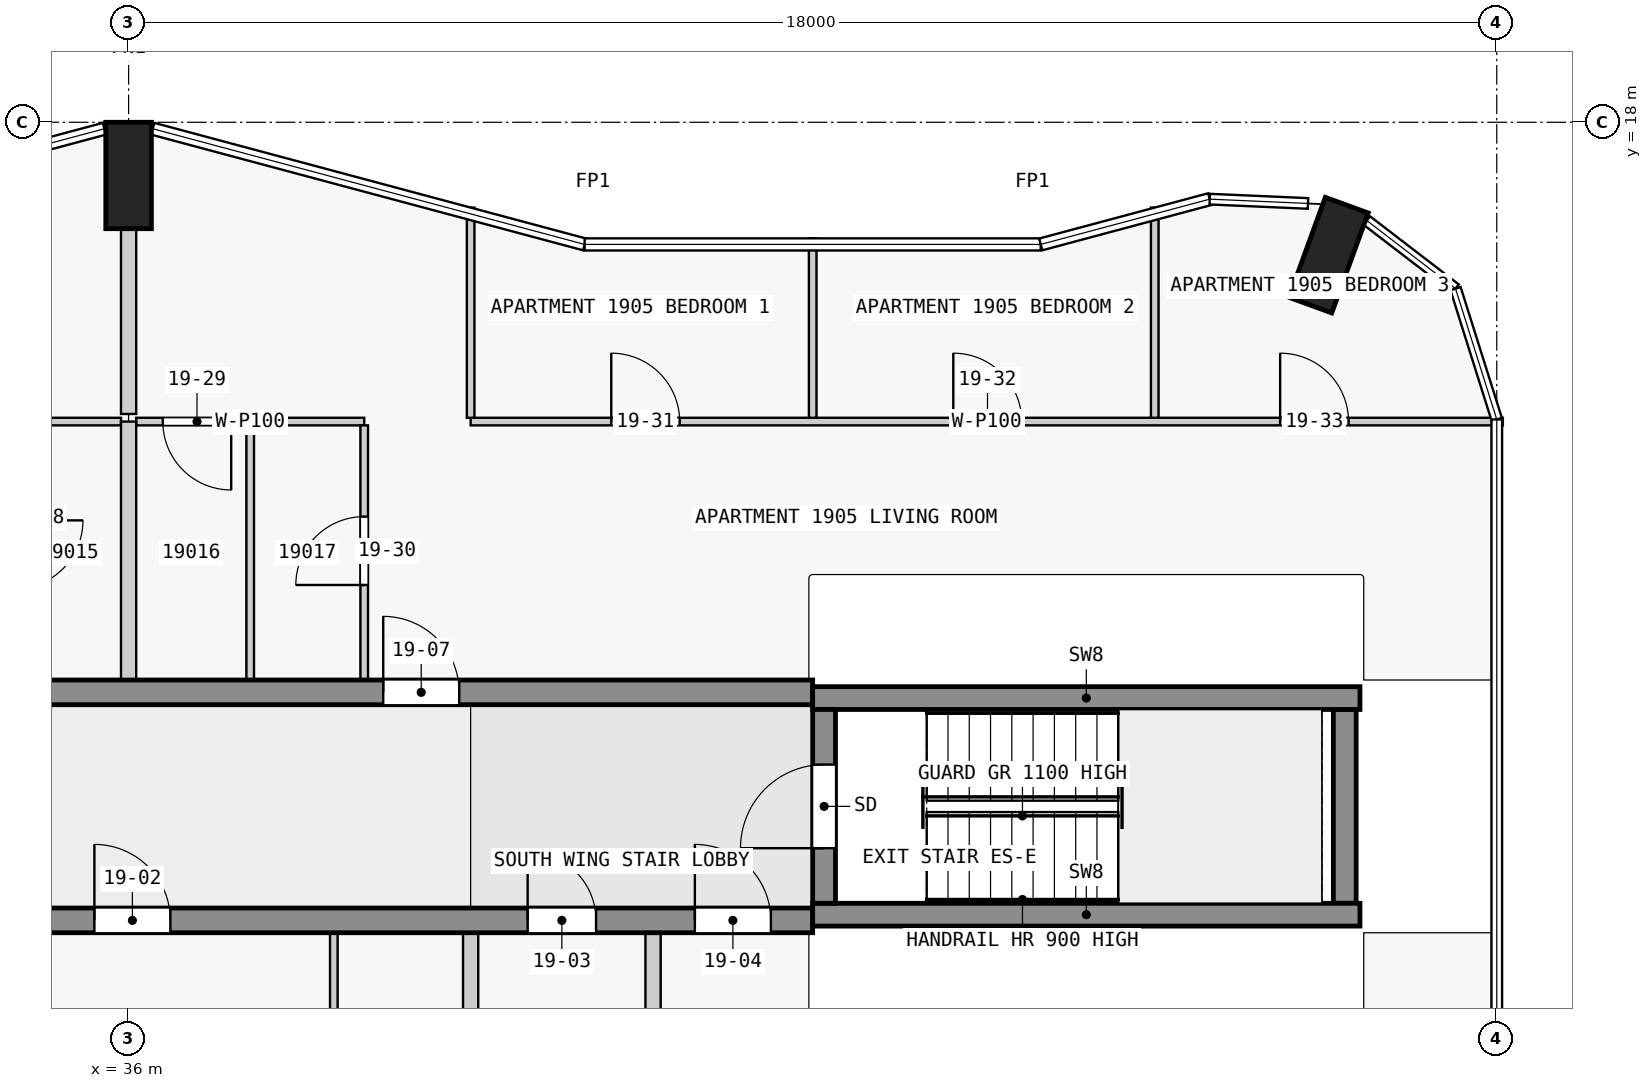
"""IFC4 building model, lengths in metres.
Left out: names, types, materials, properties, quantities, classifications, styles, units other than length and angle.
Written with IfcOpenShell. Run it as: python <this file> out.ifc"""

import sys

from ifc_helpers import new_model, si_unit, direction, frame, frame_2d, origin, origin_2d, place, context, subcontext, project, spatial, rectangle, extrude, element, fill, save


model = new_model("IFC4")
c1 = context("Model", 3, precision=1e-05, world=origin(), true_north=direction((0.0, 1.0)))
c2 = subcontext(c1, "Body", "Model", "MODEL_VIEW")
j1 = project(units=[si_unit("LENGTHUNIT", "METRE"), si_unit("PLANEANGLEUNIT", "RADIAN")], contexts=[c1])
p1 = place(None, origin())
s1 = spatial("IfcSite", under=j1, at=p1, CompositionType="ELEMENT")
p2 = place(p1, origin())
s2 = spatial("IfcBuilding", under=s1, at=p2, CompositionType="ELEMENT")
p3 = place(p2, frame((0.0, 0.0, 78.3)))
s3 = spatial("IfcBuildingStorey", under=s2, at=p3, CompositionType="ELEMENT", Elevation=78.3)
for number, where, z_axis, x_axis in (
    (1, (51.787, 16.252, 0.0), (0.0, 0.0, 1.0), (-0.94, 0.342, 0.0)),
    (2, (36.0, 17.3, 0.0), (0.0, 0.0, 1.0), (1.0, 0.0, 0.0)),
):
    element("IfcColumn", number, at=place(p3, frame(where, z_axis=z_axis, x_axis=x_axis)), inside=s3, PredefinedType="COLUMN", context=c2, shape_type="SweptSolid", body=[
        extrude(rectangle(XDim=0.6, YDim=1.4, at=origin_2d()), origin(), (0.0, 0.0, 1.0), 3.5),
    ])
p4 = place(p3, frame((45.15, 7.725, 0.0), z_axis=(0.0, 0.0, 1.0), x_axis=(0.0, 1.0, 0.0)))
e3 = element("IfcWall", 3, at=p4, inside=s3, PredefinedType="SHEAR", context=c2, shape_type="SweptSolid", body=[
    extrude(rectangle(XDim=2.55, YDim=0.3, at=frame_2d((1.275, 0.0))), origin(), (0.0, 0.0, 1.0), 3.5),
])
p5 = place(p4, frame((0.725, 0.0, 0.0)))
e4 = element("IfcOpeningElement", 4, at=p5, cuts=e3, PredefinedType="OPENING", context=c2, shape_type="SweptSolid", body=[
    extrude(rectangle(XDim=1.1, YDim=2.1, at=frame_2d((0.55, 1.05))), frame((0.0, 0.16, 0.0), z_axis=(0.0, -1.0, 0.0), x_axis=(1.0, 0.0, 0.0)), (0.0, 0.0, 1.0), 0.32),
])
p6 = place(p3, frame((52.0, 7.725, 0.0), z_axis=(0.0, 0.0, 1.0), x_axis=(0.0, 1.0, 0.0)))
e5 = element("IfcWall", 5, at=p6, inside=s3, PredefinedType="SHEAR", context=c2, shape_type="SweptSolid", body=[
    extrude(rectangle(XDim=2.55, YDim=0.3, at=frame_2d((1.275, 0.0))), origin(), (0.0, 0.0, 1.0), 3.5),
])
for number, where, z_axis, x_axis in (
    (6, (45.0, 7.575, 0.0), (0.0, 0.0, 1.0), (1.0, 0.0, 0.0)),
    (7, (45.0, 10.425, 0.0), (0.0, 0.0, 1.0), (1.0, 0.0, 0.0)),
):
    element("IfcWall", number, at=place(p3, frame(where, z_axis=z_axis, x_axis=x_axis)), inside=s3, PredefinedType="SHEAR", context=c2, shape_type="SweptSolid", body=[
        extrude(rectangle(XDim=7.2, YDim=0.3, at=frame_2d((3.6, 0.0))), origin(), (0.0, 0.0, 1.0), 3.5),
    ])
p7 = place(p3, frame((22.5, 7.5, 0.0), z_axis=(0.0, 0.0, 1.0), x_axis=(1.0, 0.0, 0.0)))
e8 = element("IfcWall", 8, at=p7, inside=s3, PredefinedType="SHEAR", context=c2, shape_type="SweptSolid", body=[
    extrude(rectangle(XDim=22.5, YDim=0.325, at=frame_2d((11.25, 0.0))), origin(), (0.0, 0.0, 1.0), 3.25),
])
p8 = place(p7, frame((4.05, 0.0, 0.0)))
e9 = element("IfcOpeningElement", 9, at=p8, cuts=e8, PredefinedType="OPENING", context=c2, shape_type="SweptSolid", body=[
    extrude(rectangle(XDim=1.0, YDim=2.1, at=frame_2d((0.5, 1.05))), frame((0.0, 0.172, 0.0), z_axis=(0.0, -1.0, 0.0), x_axis=(1.0, 0.0, 0.0)), (0.0, 0.0, 1.0), 0.345),
])
p9 = place(p7, frame((13.05, 0.0, 0.0)))
e10 = element("IfcOpeningElement", 10, at=p9, cuts=e8, PredefinedType="OPENING", context=c2, shape_type="SweptSolid", body=[
    extrude(rectangle(XDim=1.0, YDim=2.1, at=frame_2d((0.5, 1.05))), frame((0.0, 0.172, 0.0), z_axis=(0.0, -1.0, 0.0), x_axis=(1.0, 0.0, 0.0)), (0.0, 0.0, 1.0), 0.345),
])
p10 = place(p7, frame((18.75, 0.0, 0.0)))
e11 = element("IfcOpeningElement", 11, at=p10, cuts=e8, PredefinedType="OPENING", context=c2, shape_type="SweptSolid", body=[
    extrude(rectangle(XDim=0.9, YDim=2.1, at=frame_2d((0.45, 1.05))), frame((0.0, 0.172, 0.0), z_axis=(0.0, -1.0, 0.0), x_axis=(1.0, 0.0, 0.0)), (0.0, 0.0, 1.0), 0.345),
])
p11 = place(p7, frame((20.95, 0.0, 0.0)))
e12 = element("IfcOpeningElement", 12, at=p11, cuts=e8, PredefinedType="OPENING", context=c2, shape_type="SweptSolid", body=[
    extrude(rectangle(XDim=1.0, YDim=2.1, at=frame_2d((0.5, 1.05))), frame((0.0, 0.172, 0.0), z_axis=(0.0, -1.0, 0.0), x_axis=(1.0, 0.0, 0.0)), (0.0, 0.0, 1.0), 0.345),
])
p12 = place(p3, frame((22.5, 10.5, 0.0), z_axis=(0.0, 0.0, 1.0), x_axis=(1.0, 0.0, 0.0)))
e13 = element("IfcWall", 13, at=p12, inside=s3, PredefinedType="SHEAR", context=c2, shape_type="SweptSolid", body=[
    extrude(rectangle(XDim=22.5, YDim=0.325, at=frame_2d((11.25, 0.0))), origin(), (0.0, 0.0, 1.0), 3.25),
])
p13 = place(p12, frame((4.05, 0.0, 0.0)))
e14 = element("IfcOpeningElement", 14, at=p13, cuts=e13, PredefinedType="OPENING", context=c2, shape_type="SweptSolid", body=[
    extrude(rectangle(XDim=1.0, YDim=2.1, at=frame_2d((0.5, 1.05))), frame((0.0, 0.172, 0.0), z_axis=(0.0, -1.0, 0.0), x_axis=(1.0, 0.0, 0.0)), (0.0, 0.0, 1.0), 0.345),
])
p14 = place(p12, frame((10.75, 0.0, 0.0)))
e15 = element("IfcOpeningElement", 15, at=p14, cuts=e13, PredefinedType="OPENING", context=c2, shape_type="SweptSolid", body=[
    extrude(rectangle(XDim=1.0, YDim=2.1, at=frame_2d((0.5, 1.05))), frame((0.0, 0.172, 0.0), z_axis=(0.0, -1.0, 0.0), x_axis=(1.0, 0.0, 0.0)), (0.0, 0.0, 1.0), 0.345),
])
p15 = place(p12, frame((16.85, 0.0, 0.0)))
e16 = element("IfcOpeningElement", 16, at=p15, cuts=e13, PredefinedType="OPENING", context=c2, shape_type="SweptSolid", body=[
    extrude(rectangle(XDim=1.0, YDim=2.1, at=frame_2d((0.5, 1.05))), frame((0.0, 0.172, 0.0), z_axis=(0.0, -1.0, 0.0), x_axis=(1.0, 0.0, 0.0)), (0.0, 0.0, 1.0), 0.345),
])
p16 = place(p3, frame((35.9, 14.062, 0.0), z_axis=(0.0, 0.0, 1.0), x_axis=(-1.0, 0.0, 0.0)))
e17 = element("IfcWall", 17, at=p16, inside=s3, PredefinedType="PARTITIONING", context=c2, shape_type="SweptSolid", body=[
    extrude(rectangle(XDim=1.4, YDim=0.1, at=frame_2d((0.7, 0.0))), origin(), (0.0, 0.0, 1.0), 3.25),
])
p17 = place(p3, frame((39.1, 14.062, 0.0), z_axis=(0.0, 0.0, 1.0), x_axis=(-1.0, 0.0, 0.0)))
e18 = element("IfcWall", 18, at=p17, inside=s3, PredefinedType="PARTITIONING", context=c2, shape_type="SweptSolid", body=[
    extrude(rectangle(XDim=3.0, YDim=0.1, at=frame_2d((1.5, 0.0))), origin(), (0.0, 0.0, 1.0), 3.25),
])
p18 = place(p17, frame((1.75, 0.0, 0.0)))
e19 = element("IfcOpeningElement", 19, at=p18, cuts=e18, PredefinedType="OPENING", context=c2, shape_type="SweptSolid", body=[
    extrude(rectangle(XDim=0.9, YDim=2.1, at=frame_2d((0.45, 1.05))), frame((0.0, 0.06, 0.0), z_axis=(0.0, -1.0, 0.0), x_axis=(1.0, 0.0, 0.0)), (0.0, 0.0, 1.0), 0.12),
])
p19 = place(p3, frame((40.5, 14.062, 0.0), z_axis=(0.0, 0.0, 1.0), x_axis=(1.0, 0.0, 0.0)))
e20 = element("IfcWall", 20, at=p19, inside=s3, PredefinedType="PARTITIONING", context=c2, shape_type="SweptSolid", body=[
    extrude(rectangle(XDim=13.58, YDim=0.1, at=frame_2d((6.79, 0.0))), origin(), (0.0, 0.0, 1.0), 3.25),
])
p20 = place(p19, frame((1.85, 0.0, 0.0)))
e21 = element("IfcOpeningElement", 21, at=p20, cuts=e20, PredefinedType="OPENING", context=c2, shape_type="SweptSolid", body=[
    extrude(rectangle(XDim=0.9, YDim=2.1, at=frame_2d((0.45, 1.05))), frame((0.0, 0.06, 0.0), z_axis=(0.0, -1.0, 0.0), x_axis=(1.0, 0.0, 0.0)), (0.0, 0.0, 1.0), 0.12),
])
p21 = place(p19, frame((6.35, 0.0, 0.0)))
e22 = element("IfcOpeningElement", 22, at=p21, cuts=e20, PredefinedType="OPENING", context=c2, shape_type="SweptSolid", body=[
    extrude(rectangle(XDim=0.9, YDim=2.1, at=frame_2d((0.45, 1.05))), frame((0.0, 0.06, 0.0), z_axis=(0.0, -1.0, 0.0), x_axis=(1.0, 0.0, 0.0)), (0.0, 0.0, 1.0), 0.12),
])
p22 = place(p19, frame((10.65, 0.0, 0.0)))
e23 = element("IfcOpeningElement", 23, at=p22, cuts=e20, PredefinedType="OPENING", context=c2, shape_type="SweptSolid", body=[
    extrude(rectangle(XDim=0.9, YDim=2.1, at=frame_2d((0.45, 1.05))), frame((0.0, 0.06, 0.0), z_axis=(0.0, -1.0, 0.0), x_axis=(1.0, 0.0, 0.0)), (0.0, 0.0, 1.0), 0.12),
])
p23 = place(p3, frame((36.0, 16.6, 0.0), z_axis=(0.0, 0.0, 1.0), x_axis=(0.0, -1.0, 0.0)))
e24 = element("IfcWall", 24, at=p23, inside=s3, PredefinedType="PARTITIONING", context=c2, shape_type="SweptSolid", body=[
    extrude(rectangle(XDim=2.438, YDim=0.2, at=frame_2d((1.219, 0.0))), origin(), (0.0, 0.0, 1.0), 3.25),
])
p24 = place(p3, frame((36.0, 10.663, 0.0), z_axis=(0.0, 0.0, 1.0), x_axis=(0.0, 1.0, 0.0)))
e25 = element("IfcWall", 25, at=p24, inside=s3, PredefinedType="PARTITIONING", context=c2, shape_type="SweptSolid", body=[
    extrude(rectangle(XDim=3.4, YDim=0.2, at=frame_2d((1.7, 0.0))), origin(), (0.0, 0.0, 1.0), 3.25),
])
p25 = place(p3, frame((37.6, 10.663, 0.0), z_axis=(0.0, 0.0, 1.0), x_axis=(0.0, 1.0, 0.0)))
e26 = element("IfcWall", 26, at=p25, inside=s3, PredefinedType="PARTITIONING", context=c2, shape_type="SweptSolid", body=[
    extrude(rectangle(XDim=3.35, YDim=0.1, at=frame_2d((1.675, 0.0))), origin(), (0.0, 0.0, 1.0), 3.25),
])
p26 = place(p3, frame((38.7, 7.337, 0.0), z_axis=(0.0, 0.0, 1.0), x_axis=(0.0, -1.0, 0.0)))
e27 = element("IfcWall", 27, at=p26, inside=s3, PredefinedType="PARTITIONING", context=c2, shape_type="SweptSolid", body=[
    extrude(rectangle(XDim=3.4, YDim=0.1, at=frame_2d((1.7, 0.0))), origin(), (0.0, 0.0, 1.0), 3.25),
])
p27 = place(p26, frame((1.25, 0.0, 0.0)))
e28 = element("IfcOpeningElement", 28, at=p27, cuts=e27, PredefinedType="OPENING", context=c2, shape_type="SweptSolid", body=[
    extrude(rectangle(XDim=0.9, YDim=2.1, at=frame_2d((0.45, 1.05))), frame((0.0, 0.06, 0.0), z_axis=(0.0, -1.0, 0.0), x_axis=(1.0, 0.0, 0.0)), (0.0, 0.0, 1.0), 0.12),
])
p28 = place(p3, frame((39.1, 10.663, 0.0), z_axis=(0.0, 0.0, 1.0), x_axis=(0.0, 1.0, 0.0)))
e29 = element("IfcWall", 29, at=p28, inside=s3, PredefinedType="PARTITIONING", context=c2, shape_type="SweptSolid", body=[
    extrude(rectangle(XDim=3.35, YDim=0.1, at=frame_2d((1.675, 0.0))), origin(), (0.0, 0.0, 1.0), 3.25),
])
p29 = place(p28, frame((1.25, 0.0, 0.0)))
e30 = element("IfcOpeningElement", 30, at=p29, cuts=e29, PredefinedType="OPENING", context=c2, shape_type="SweptSolid", body=[
    extrude(rectangle(XDim=0.9, YDim=2.1, at=frame_2d((0.45, 1.05))), frame((0.0, 0.06, 0.0), z_axis=(0.0, -1.0, 0.0), x_axis=(1.0, 0.0, 0.0)), (0.0, 0.0, 1.0), 0.12),
])
p30 = place(p3, frame((40.5, 16.878, 0.0), z_axis=(0.0, 0.0, 1.0), x_axis=(0.0, -1.0, 0.0)))
e31 = element("IfcWall", 31, at=p30, inside=s3, PredefinedType="PARTITIONING", context=c2, shape_type="SweptSolid", body=[
    extrude(rectangle(XDim=2.765, YDim=0.1, at=frame_2d((1.383, 0.0))), origin(), (0.0, 0.0, 1.0), 3.25),
])
p31 = place(p3, frame((40.5, 1.122, 0.0), z_axis=(0.0, 0.0, 1.0), x_axis=(0.0, 1.0, 0.0)))
e32 = element("IfcWall", 32, at=p31, inside=s3, PredefinedType="PARTITIONING", context=c2, shape_type="SweptSolid", body=[
    extrude(rectangle(XDim=6.215, YDim=0.2, at=frame_2d((3.107, 0.0))), origin(), (0.0, 0.0, 1.0), 3.25),
])
p32 = place(p3, frame((42.9, 3.938, 0.0), z_axis=(0.0, 0.0, 1.0), x_axis=(0.0, 1.0, 0.0)))
e33 = element("IfcWall", 33, at=p32, inside=s3, PredefinedType="PARTITIONING", context=c2, shape_type="SweptSolid", body=[
    extrude(rectangle(XDim=3.4, YDim=0.2, at=frame_2d((1.7, 0.0))), origin(), (0.0, 0.0, 1.0), 3.25),
])
p33 = place(p3, frame((45.0, 14.113, 0.0), z_axis=(0.0, 0.0, 1.0), x_axis=(0.0, 1.0, 0.0)))
e34 = element("IfcWall", 34, at=p33, inside=s3, PredefinedType="PARTITIONING", context=c2, shape_type="SweptSolid", body=[
    extrude(rectangle(XDim=2.361, YDim=0.1, at=frame_2d((1.18, 0.0))), origin(), (0.0, 0.0, 1.0), 3.25),
])
p34 = place(p3, frame((49.5, 14.113, 0.0), z_axis=(0.0, 0.0, 1.0), x_axis=(0.0, 1.0, 0.0)))
e35 = element("IfcWall", 35, at=p34, inside=s3, PredefinedType="PARTITIONING", context=c2, shape_type="SweptSolid", body=[
    extrude(rectangle(XDim=2.765, YDim=0.1, at=frame_2d((1.383, 0.0))), origin(), (0.0, 0.0, 1.0), 3.25),
])
p35 = place(p5, origin())
e36 = element("IfcDoor", 36, at=p35, inside=s3, OperationType="SINGLE_SWING_LEFT", PredefinedType="DOOR", context=c2, shape_type="SweptSolid", body=[
    extrude(rectangle(XDim=1.1, YDim=2.1, at=frame_2d((0.55, 1.05))), frame((0.0, 0.025, 0.0), z_axis=(0.0, -1.0, 0.0), x_axis=(1.0, 0.0, 0.0)), (0.0, 0.0, 1.0), 0.05),
])
fill(e4, e36)
p36 = place(p9, origin())
e37 = element("IfcDoor", 37, at=p36, inside=s3, OperationType="SINGLE_SWING_RIGHT", PredefinedType="DOOR", context=c2, shape_type="SweptSolid", body=[
    extrude(rectangle(XDim=1.0, YDim=2.1, at=frame_2d((0.5, 1.05))), frame((0.0, 0.025, 0.0), z_axis=(0.0, -1.0, 0.0), x_axis=(1.0, 0.0, 0.0)), (0.0, 0.0, 1.0), 0.05),
])
fill(e10, e37)
p37 = place(p10, origin())
e38 = element("IfcDoor", 38, at=p37, inside=s3, OperationType="SINGLE_SWING_RIGHT", PredefinedType="DOOR", context=c2, shape_type="SweptSolid", body=[
    extrude(rectangle(XDim=0.9, YDim=2.1, at=frame_2d((0.45, 1.05))), frame((0.0, 0.025, 0.0), z_axis=(0.0, -1.0, 0.0), x_axis=(1.0, 0.0, 0.0)), (0.0, 0.0, 1.0), 0.05),
])
fill(e11, e38)
p38 = place(p11, origin())
e39 = element("IfcDoor", 39, at=p38, inside=s3, OperationType="SINGLE_SWING_RIGHT", PredefinedType="DOOR", context=c2, shape_type="SweptSolid", body=[
    extrude(rectangle(XDim=1.0, YDim=2.1, at=frame_2d((0.5, 1.05))), frame((0.0, 0.025, 0.0), z_axis=(0.0, -1.0, 0.0), x_axis=(1.0, 0.0, 0.0)), (0.0, 0.0, 1.0), 0.05),
])
fill(e12, e39)
p39 = place(p15, origin())
e40 = element("IfcDoor", 40, at=p39, inside=s3, OperationType="SINGLE_SWING_RIGHT", PredefinedType="DOOR", context=c2, shape_type="SweptSolid", body=[
    extrude(rectangle(XDim=1.0, YDim=2.1, at=frame_2d((0.5, 1.05))), frame((0.0, 0.025, 0.0), z_axis=(0.0, -1.0, 0.0), x_axis=(1.0, 0.0, 0.0)), (0.0, 0.0, 1.0), 0.05),
])
fill(e16, e40)
p40 = place(p18, origin())
e41 = element("IfcDoor", 41, at=p40, inside=s3, OperationType="SINGLE_SWING_RIGHT", PredefinedType="DOOR", context=c2, shape_type="SweptSolid", body=[
    extrude(rectangle(XDim=0.9, YDim=2.1, at=frame_2d((0.45, 1.05))), frame((0.0, 0.025, 0.0), z_axis=(0.0, -1.0, 0.0), x_axis=(1.0, 0.0, 0.0)), (0.0, 0.0, 1.0), 0.05),
])
fill(e19, e41)
p41 = place(p29, origin())
e42 = element("IfcDoor", 42, at=p41, inside=s3, OperationType="SINGLE_SWING_RIGHT", PredefinedType="DOOR", context=c2, shape_type="SweptSolid", body=[
    extrude(rectangle(XDim=0.9, YDim=2.1, at=frame_2d((0.45, 1.05))), frame((0.0, 0.025, 0.0), z_axis=(0.0, -1.0, 0.0), x_axis=(1.0, 0.0, 0.0)), (0.0, 0.0, 1.0), 0.05),
])
fill(e30, e42)
p42 = place(p20, origin())
e43 = element("IfcDoor", 43, at=p42, inside=s3, OperationType="SINGLE_SWING_LEFT", PredefinedType="DOOR", context=c2, shape_type="SweptSolid", body=[
    extrude(rectangle(XDim=0.9, YDim=2.1, at=frame_2d((0.45, 1.05))), frame((0.0, 0.025, 0.0), z_axis=(0.0, -1.0, 0.0), x_axis=(1.0, 0.0, 0.0)), (0.0, 0.0, 1.0), 0.05),
])
fill(e21, e43)
p43 = place(p21, origin())
e44 = element("IfcDoor", 44, at=p43, inside=s3, OperationType="SINGLE_SWING_RIGHT", PredefinedType="DOOR", context=c2, shape_type="SweptSolid", body=[
    extrude(rectangle(XDim=0.9, YDim=2.1, at=frame_2d((0.45, 1.05))), frame((0.0, 0.025, 0.0), z_axis=(0.0, -1.0, 0.0), x_axis=(1.0, 0.0, 0.0)), (0.0, 0.0, 1.0), 0.05),
])
fill(e22, e44)
p44 = place(p22, origin())
e45 = element("IfcDoor", 45, at=p44, inside=s3, OperationType="SINGLE_SWING_RIGHT", PredefinedType="DOOR", context=c2, shape_type="SweptSolid", body=[
    extrude(rectangle(XDim=0.9, YDim=2.1, at=frame_2d((0.45, 1.05))), frame((0.0, 0.025, 0.0), z_axis=(0.0, -1.0, 0.0), x_axis=(1.0, 0.0, 0.0)), (0.0, 0.0, 1.0), 0.05),
])
fill(e23, e45)
save(model, sys.argv[1])
